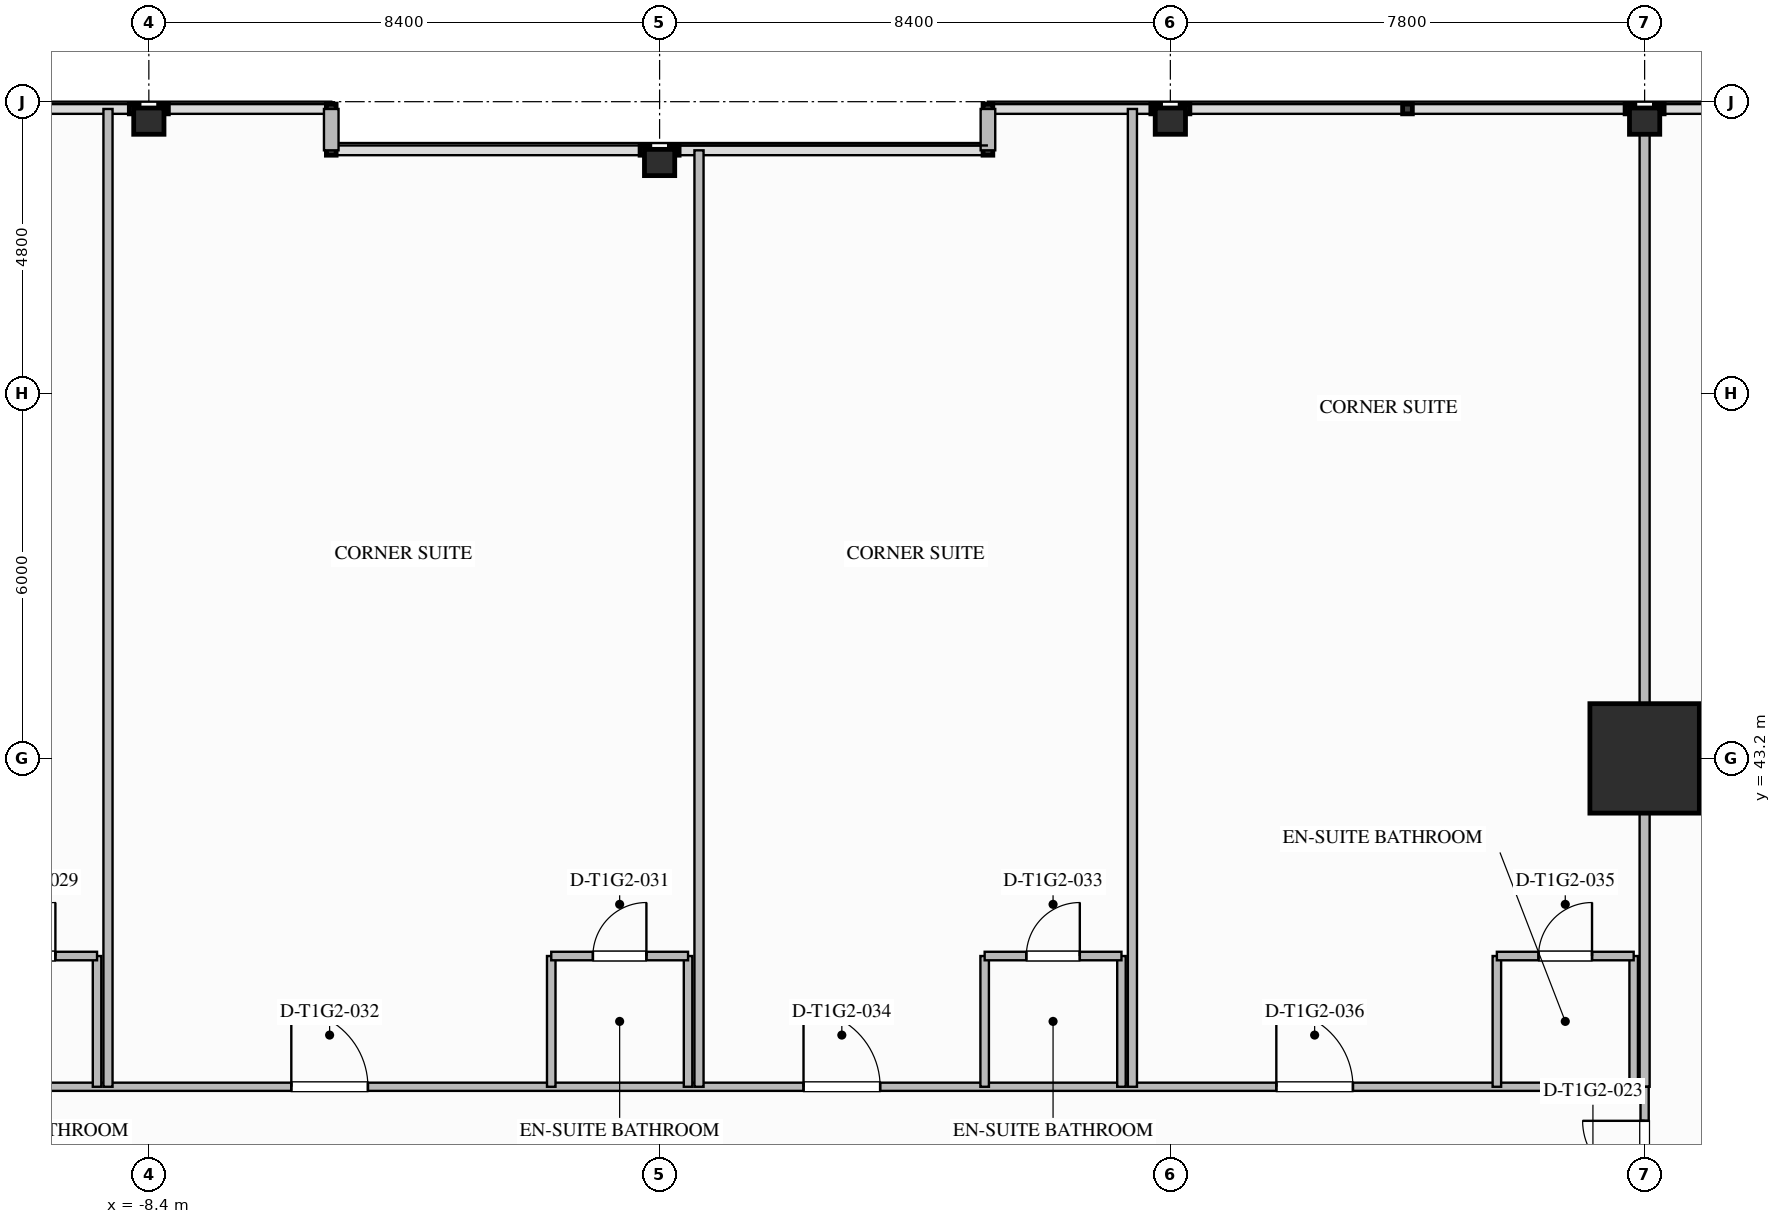
"""IFC4 building model, lengths in metres.
Left out: names, types, materials, properties, quantities, classifications, styles, units other than length and angle.
Written with IfcOpenShell. Run it as: python <this file> out.ifc"""

import sys

from ifc_helpers import new_model, si_unit, direction, frame, frame_2d, origin, origin_2d, place, context, subcontext, project, spatial, rectangle, i_section, extrude, element, fill, save


model = new_model("IFC4")
c1 = context("Model", 3, precision=1e-05, world=origin(), true_north=direction((0.0, 1.0)))
c2 = subcontext(c1, "Body", "Model", "MODEL_VIEW")
j1 = project(units=[si_unit("LENGTHUNIT", "METRE"), si_unit("PLANEANGLEUNIT", "RADIAN")], contexts=[c1])
p1 = place(None, origin())
s1 = spatial("IfcSite", under=j1, at=p1, CompositionType="ELEMENT")
p2 = place(p1, origin())
s2 = spatial("IfcBuilding", under=s1, at=p2, CompositionType="ELEMENT")
p3 = place(p2, frame((0.0, 0.0, 43.7)))
s3 = spatial("IfcBuildingStorey", under=s2, at=p3, CompositionType="ELEMENT", Elevation=43.7)
p4 = place(p3, frame((16.2, 43.2, 0.0), z_axis=(0.0, 0.0, 1.0), x_axis=(1.0, 0.0, 0.0)))
e1 = element("IfcColumn", 1, at=p4, inside=s3, PredefinedType="COLUMN", context=c2, shape_type="SweptSolid", body=[
    extrude(rectangle(XDim=1.8, YDim=1.8, at=origin_2d()), origin(), (0.0, 0.0, 1.0), 3.5),
])
for number, where, z_axis, x_axis in (
    (2, (-8.4, 53.68, 0.0), (0.0, 0.0, 1.0), (0.0, 1.0, 0.0)),
    (3, (0.0, 53.0, 0.0), (0.0, 0.0, 1.0), (0.0, 1.0, 0.0)),
    (4, (8.4, 53.68, 0.0), (0.0, 0.0, 1.0), (0.0, 1.0, 0.0)),
    (5, (16.2, 53.68, 0.0), (0.0, 0.0, 1.0), (0.0, 1.0, 0.0)),
):
    element("IfcColumn", number, at=place(p3, frame(where, z_axis=z_axis, x_axis=x_axis)), inside=s3, PredefinedType="COLUMN", context=c2, shape_type="SweptSolid", body=[
        extrude(i_section(OverallWidth=0.432, OverallDepth=0.498, WebThickness=0.056, FlangeThickness=0.089, FilletRadius=0.03, at=origin_2d()), origin(), (0.0, 0.0, 1.0), 3.497),
    ])
for number, where, z_axis, x_axis in (
    (6, (-5.4, 53.88, 0.0), (0.0, 0.0, 1.0), (0.0, -1.0, 0.0)),
    (7, (5.4, 53.2, 0.0), (0.0, 0.0, 1.0), (0.0, 1.0, 0.0)),
):
    element("IfcWall", number, at=place(p3, frame(where, z_axis=z_axis, x_axis=x_axis)), inside=s3, PredefinedType="STANDARD", context=c2, shape_type="SweptSolid", body=[
        extrude(rectangle(XDim=0.68, YDim=0.24, at=frame_2d((0.34, 0.0))), origin(), (0.0, 0.0, 1.0), 3.24),
    ])
p5 = place(p3, frame((-16.2, 37.8, 0.0), z_axis=(0.0, 0.0, 1.0), x_axis=(1.0, 0.0, 0.0)))
e8 = element("IfcWall", 8, at=p5, inside=s3, PredefinedType="PARTITIONING", context=c2, shape_type="SweptSolid", body=[
    extrude(rectangle(XDim=32.4, YDim=0.135, at=frame_2d((16.2, 0.0))), origin(), (0.0, 0.0, 1.0), 3.24),
])
p6 = place(p5, frame((1.719, 0.0, 0.0)))
e9 = element("IfcOpeningElement", 9, at=p6, cuts=e8, PredefinedType="OPENING", context=c2, shape_type="SweptSolid", body=[
    extrude(rectangle(XDim=1.26, YDim=2.2, at=frame_2d((0.63, 1.1))), frame((0.0, 0.077, 0.0), z_axis=(0.0, -1.0, 0.0), x_axis=(1.0, 0.0, 0.0)), (0.0, 0.0, 1.0), 0.155),
])
p7 = place(p5, frame((10.143, 0.0, 0.0)))
e10 = element("IfcOpeningElement", 10, at=p7, cuts=e8, PredefinedType="OPENING", context=c2, shape_type="SweptSolid", body=[
    extrude(rectangle(XDim=1.26, YDim=2.2, at=frame_2d((0.63, 1.1))), frame((0.0, 0.077, 0.0), z_axis=(0.0, -1.0, 0.0), x_axis=(1.0, 0.0, 0.0)), (0.0, 0.0, 1.0), 0.155),
])
p8 = place(p5, frame((18.567, 0.0, 0.0)))
e11 = element("IfcOpeningElement", 11, at=p8, cuts=e8, PredefinedType="OPENING", context=c2, shape_type="SweptSolid", body=[
    extrude(rectangle(XDim=1.26, YDim=2.2, at=frame_2d((0.63, 1.1))), frame((0.0, 0.077, 0.0), z_axis=(0.0, -1.0, 0.0), x_axis=(1.0, 0.0, 0.0)), (0.0, 0.0, 1.0), 0.155),
])
p9 = place(p5, frame((26.343, 0.0, 0.0)))
e12 = element("IfcOpeningElement", 12, at=p9, cuts=e8, PredefinedType="OPENING", context=c2, shape_type="SweptSolid", body=[
    extrude(rectangle(XDim=1.26, YDim=2.2, at=frame_2d((0.63, 1.1))), frame((0.0, 0.077, 0.0), z_axis=(0.0, -1.0, 0.0), x_axis=(1.0, 0.0, 0.0)), (0.0, 0.0, 1.0), 0.155),
])
p10 = place(p3, frame((16.2, 37.8, 0.0), z_axis=(0.0, 0.0, 1.0), x_axis=(0.0, 1.0, 0.0)))
e13 = element("IfcWall", 13, at=p10, inside=s3, PredefinedType="PARTITIONING", context=c2, shape_type="SweptSolid", body=[
    extrude(rectangle(XDim=16.08, YDim=0.165, at=frame_2d((8.04, 0.0))), origin(), (0.0, 0.0, 1.0), 2.298),
])
p11 = place(p3, frame((16.2, 35.7, 0.0), z_axis=(0.0, 0.0, 1.0), x_axis=(0.0, 1.0, 0.0)))
e14 = element("IfcWall", 14, at=p11, inside=s3, PredefinedType="PARTITIONING", context=c2, shape_type="SweptSolid", body=[
    extrude(rectangle(XDim=2.1, YDim=0.135, at=frame_2d((1.05, 0.0))), origin(), (0.0, 0.0, 1.0), 2.298),
])
p12 = place(p11, frame((0.52, 0.0, 0.0)))
e15 = element("IfcOpeningElement", 15, at=p12, cuts=e14, PredefinedType="OPENING", context=c2, shape_type="SweptSolid", body=[
    extrude(rectangle(XDim=1.02, YDim=2.15, at=frame_2d((0.51, 1.075))), frame((0.0, 0.077, 0.0), z_axis=(0.0, -1.0, 0.0), x_axis=(1.0, 0.0, 0.0)), (0.0, 0.0, 1.0), 0.155),
])
p13 = place(p3, frame((-9.252, 37.8, 0.0), z_axis=(0.0, 0.0, 1.0), x_axis=(0.0, 1.0, 0.0)))
e16 = element("IfcWall", 16, at=p13, inside=s3, PredefinedType="PLUMBINGWALL", context=c2, shape_type="SweptSolid", body=[
    extrude(rectangle(XDim=2.15, YDim=0.14, at=frame_2d((1.075, 0.0))), origin(), (0.0, 0.0, 1.0), 3.24),
])
p14 = place(p3, frame((-11.502, 39.95, 0.0), z_axis=(0.0, 0.0, 1.0), x_axis=(1.0, 0.0, 0.0)))
e17 = element("IfcWall", 17, at=p14, inside=s3, PredefinedType="PLUMBINGWALL", context=c2, shape_type="SweptSolid", body=[
    extrude(rectangle(XDim=2.25, YDim=0.14, at=frame_2d((1.125, 0.0))), origin(), (0.0, 0.0, 1.0), 3.24),
])
p15 = place(p14, frame((0.685, 0.0, 0.0)))
e18 = element("IfcOpeningElement", 18, at=p15, cuts=e17, PredefinedType="OPENING", context=c2, shape_type="SweptSolid", body=[
    extrude(rectangle(XDim=0.88, YDim=2.1, at=frame_2d((0.44, 1.05))), frame((0.0, 0.08, 0.0), z_axis=(0.0, -1.0, 0.0), x_axis=(1.0, 0.0, 0.0)), (0.0, 0.0, 1.0), 0.16),
])
p16 = place(p3, frame((-9.072, 37.8, 0.0), z_axis=(0.0, 0.0, 1.0), x_axis=(0.0, 1.0, 0.0)))
e19 = element("IfcWall", 19, at=p16, inside=s3, PredefinedType="PARTITIONING", context=c2, shape_type="SweptSolid", body=[
    extrude(rectangle(XDim=16.08, YDim=0.15, at=frame_2d((8.04, 0.0))), origin(), (0.0, 0.0, 1.0), 3.24),
])
for number, where, z_axis, x_axis in (
    (20, (-1.782, 37.8, 0.0), (0.0, 0.0, 1.0), (0.0, 1.0, 0.0)),
    (21, (0.468, 37.8, 0.0), (0.0, 0.0, 1.0), (0.0, 1.0, 0.0)),
):
    element("IfcWall", number, at=place(p3, frame(where, z_axis=z_axis, x_axis=x_axis)), inside=s3, PredefinedType="PLUMBINGWALL", context=c2, shape_type="SweptSolid", body=[
        extrude(rectangle(XDim=2.15, YDim=0.14, at=frame_2d((1.075, 0.0))), origin(), (0.0, 0.0, 1.0), 3.24),
    ])
p17 = place(p3, frame((-1.782, 39.95, 0.0), z_axis=(0.0, 0.0, 1.0), x_axis=(1.0, 0.0, 0.0)))
e22 = element("IfcWall", 22, at=p17, inside=s3, PredefinedType="PLUMBINGWALL", context=c2, shape_type="SweptSolid", body=[
    extrude(rectangle(XDim=2.25, YDim=0.14, at=frame_2d((1.125, 0.0))), origin(), (0.0, 0.0, 1.0), 3.24),
])
p18 = place(p17, frame((0.685, 0.0, 0.0)))
e23 = element("IfcOpeningElement", 23, at=p18, cuts=e22, PredefinedType="OPENING", context=c2, shape_type="SweptSolid", body=[
    extrude(rectangle(XDim=0.88, YDim=2.1, at=frame_2d((0.44, 1.05))), frame((0.0, 0.08, 0.0), z_axis=(0.0, -1.0, 0.0), x_axis=(1.0, 0.0, 0.0)), (0.0, 0.0, 1.0), 0.16),
])
p19 = place(p3, frame((0.648, 37.8, 0.0), z_axis=(0.0, 0.0, 1.0), x_axis=(0.0, 1.0, 0.0)))
e24 = element("IfcWall", 24, at=p19, inside=s3, PredefinedType="PARTITIONING", context=c2, shape_type="SweptSolid", body=[
    extrude(rectangle(XDim=15.4, YDim=0.15, at=frame_2d((7.7, 0.0))), origin(), (0.0, 0.0, 1.0), 3.24),
])
for number, where, z_axis, x_axis in (
    (25, (5.346, 37.8, 0.0), (0.0, 0.0, 1.0), (0.0, 1.0, 0.0)),
    (26, (7.596, 37.8, 0.0), (0.0, 0.0, 1.0), (0.0, 1.0, 0.0)),
):
    element("IfcWall", number, at=place(p3, frame(where, z_axis=z_axis, x_axis=x_axis)), inside=s3, PredefinedType="PLUMBINGWALL", context=c2, shape_type="SweptSolid", body=[
        extrude(rectangle(XDim=2.15, YDim=0.14, at=frame_2d((1.075, 0.0))), origin(), (0.0, 0.0, 1.0), 3.24),
    ])
p20 = place(p3, frame((5.346, 39.95, 0.0), z_axis=(0.0, 0.0, 1.0), x_axis=(1.0, 0.0, 0.0)))
e27 = element("IfcWall", 27, at=p20, inside=s3, PredefinedType="PLUMBINGWALL", context=c2, shape_type="SweptSolid", body=[
    extrude(rectangle(XDim=2.25, YDim=0.14, at=frame_2d((1.125, 0.0))), origin(), (0.0, 0.0, 1.0), 3.24),
])
p21 = place(p20, frame((0.685, 0.0, 0.0)))
e28 = element("IfcOpeningElement", 28, at=p21, cuts=e27, PredefinedType="OPENING", context=c2, shape_type="SweptSolid", body=[
    extrude(rectangle(XDim=0.88, YDim=2.1, at=frame_2d((0.44, 1.05))), frame((0.0, 0.08, 0.0), z_axis=(0.0, -1.0, 0.0), x_axis=(1.0, 0.0, 0.0)), (0.0, 0.0, 1.0), 0.16),
])
p22 = place(p3, frame((7.776, 37.8, 0.0), z_axis=(0.0, 0.0, 1.0), x_axis=(0.0, 1.0, 0.0)))
e29 = element("IfcWall", 29, at=p22, inside=s3, PredefinedType="PARTITIONING", context=c2, shape_type="SweptSolid", body=[
    extrude(rectangle(XDim=16.08, YDim=0.15, at=frame_2d((8.04, 0.0))), origin(), (0.0, 0.0, 1.0), 3.24),
])
p23 = place(p3, frame((13.77, 37.8, 0.0), z_axis=(0.0, 0.0, 1.0), x_axis=(0.0, 1.0, 0.0)))
e30 = element("IfcWall", 30, at=p23, inside=s3, PredefinedType="PLUMBINGWALL", context=c2, shape_type="SweptSolid", body=[
    extrude(rectangle(XDim=2.15, YDim=0.14, at=frame_2d((1.075, 0.0))), origin(), (0.0, 0.0, 1.0), 3.24),
])
p24 = place(p3, frame((16.02, 37.8, 0.0), z_axis=(0.0, 0.0, 1.0), x_axis=(0.0, 1.0, 0.0)))
e31 = element("IfcWall", 31, at=p24, inside=s3, PredefinedType="PLUMBINGWALL", context=c2, shape_type="SweptSolid", body=[
    extrude(rectangle(XDim=2.15, YDim=0.14, at=frame_2d((1.075, 0.0))), origin(), (0.0, 0.0, 1.0), 2.298),
])
p25 = place(p3, frame((13.77, 39.95, 0.0), z_axis=(0.0, 0.0, 1.0), x_axis=(1.0, 0.0, 0.0)))
e32 = element("IfcWall", 32, at=p25, inside=s3, PredefinedType="PLUMBINGWALL", context=c2, shape_type="SweptSolid", body=[
    extrude(rectangle(XDim=2.25, YDim=0.14, at=frame_2d((1.125, 0.0))), origin(), (0.0, 0.0, 1.0), 3.24),
])
p26 = place(p25, frame((0.685, 0.0, 0.0)))
e33 = element("IfcOpeningElement", 33, at=p26, cuts=e32, PredefinedType="OPENING", context=c2, shape_type="SweptSolid", body=[
    extrude(rectangle(XDim=0.88, YDim=2.1, at=frame_2d((0.44, 1.05))), frame((0.0, 0.08, 0.0), z_axis=(0.0, -1.0, 0.0), x_axis=(1.0, 0.0, 0.0)), (0.0, 0.0, 1.0), 0.16),
])
p27 = place(p12, origin())
e34 = element("IfcDoor", 34, at=p27, inside=s3, OperationType="SINGLE_SWING_RIGHT", PredefinedType="DOOR", context=c2, shape_type="SweptSolid", body=[
    extrude(rectangle(XDim=1.02, YDim=2.15, at=frame_2d((0.51, 1.075))), frame((0.0, 0.025, 0.0), z_axis=(0.0, -1.0, 0.0), x_axis=(1.0, 0.0, 0.0)), (0.0, 0.0, 1.0), 0.05),
])
fill(e15, e34)
p28 = place(p15, origin())
e35 = element("IfcDoor", 35, at=p28, inside=s3, OperationType="SINGLE_SWING_RIGHT", PredefinedType="DOOR", context=c2, shape_type="SweptSolid", body=[
    extrude(rectangle(XDim=0.88, YDim=2.1, at=frame_2d((0.44, 1.05))), frame((0.0, 0.025, 0.0), z_axis=(0.0, -1.0, 0.0), x_axis=(1.0, 0.0, 0.0)), (0.0, 0.0, 1.0), 0.05),
])
fill(e18, e35)
p29 = place(p18, origin())
e36 = element("IfcDoor", 36, at=p29, inside=s3, OperationType="SINGLE_SWING_RIGHT", PredefinedType="DOOR", context=c2, shape_type="SweptSolid", body=[
    extrude(rectangle(XDim=0.88, YDim=2.1, at=frame_2d((0.44, 1.05))), frame((0.0, 0.025, 0.0), z_axis=(0.0, -1.0, 0.0), x_axis=(1.0, 0.0, 0.0)), (0.0, 0.0, 1.0), 0.05),
])
fill(e23, e36)
p30 = place(p7, origin())
e37 = element("IfcDoor", 37, at=p30, inside=s3, OperationType="SINGLE_SWING_LEFT", PredefinedType="DOOR", context=c2, shape_type="SweptSolid", body=[
    extrude(rectangle(XDim=1.26, YDim=2.2, at=frame_2d((0.63, 1.1))), frame((0.0, 0.025, 0.0), z_axis=(0.0, -1.0, 0.0), x_axis=(1.0, 0.0, 0.0)), (0.0, 0.0, 1.0), 0.05),
])
fill(e10, e37)
p31 = place(p21, origin())
e38 = element("IfcDoor", 38, at=p31, inside=s3, OperationType="SINGLE_SWING_RIGHT", PredefinedType="DOOR", context=c2, shape_type="SweptSolid", body=[
    extrude(rectangle(XDim=0.88, YDim=2.1, at=frame_2d((0.44, 1.05))), frame((0.0, 0.025, 0.0), z_axis=(0.0, -1.0, 0.0), x_axis=(1.0, 0.0, 0.0)), (0.0, 0.0, 1.0), 0.05),
])
fill(e28, e38)
p32 = place(p8, origin())
e39 = element("IfcDoor", 39, at=p32, inside=s3, OperationType="SINGLE_SWING_LEFT", PredefinedType="DOOR", context=c2, shape_type="SweptSolid", body=[
    extrude(rectangle(XDim=1.26, YDim=2.2, at=frame_2d((0.63, 1.1))), frame((0.0, 0.025, 0.0), z_axis=(0.0, -1.0, 0.0), x_axis=(1.0, 0.0, 0.0)), (0.0, 0.0, 1.0), 0.05),
])
fill(e11, e39)
p33 = place(p26, origin())
e40 = element("IfcDoor", 40, at=p33, inside=s3, OperationType="SINGLE_SWING_RIGHT", PredefinedType="DOOR", context=c2, shape_type="SweptSolid", body=[
    extrude(rectangle(XDim=0.88, YDim=2.1, at=frame_2d((0.44, 1.05))), frame((0.0, 0.025, 0.0), z_axis=(0.0, -1.0, 0.0), x_axis=(1.0, 0.0, 0.0)), (0.0, 0.0, 1.0), 0.05),
])
fill(e33, e40)
p34 = place(p9, origin())
e41 = element("IfcDoor", 41, at=p34, inside=s3, OperationType="SINGLE_SWING_LEFT", PredefinedType="DOOR", context=c2, shape_type="SweptSolid", body=[
    extrude(rectangle(XDim=1.26, YDim=2.2, at=frame_2d((0.63, 1.1))), frame((0.0, 0.025, 0.0), z_axis=(0.0, -1.0, 0.0), x_axis=(1.0, 0.0, 0.0)), (0.0, 0.0, 1.0), 0.05),
])
fill(e12, e41)
save(model, sys.argv[1])
